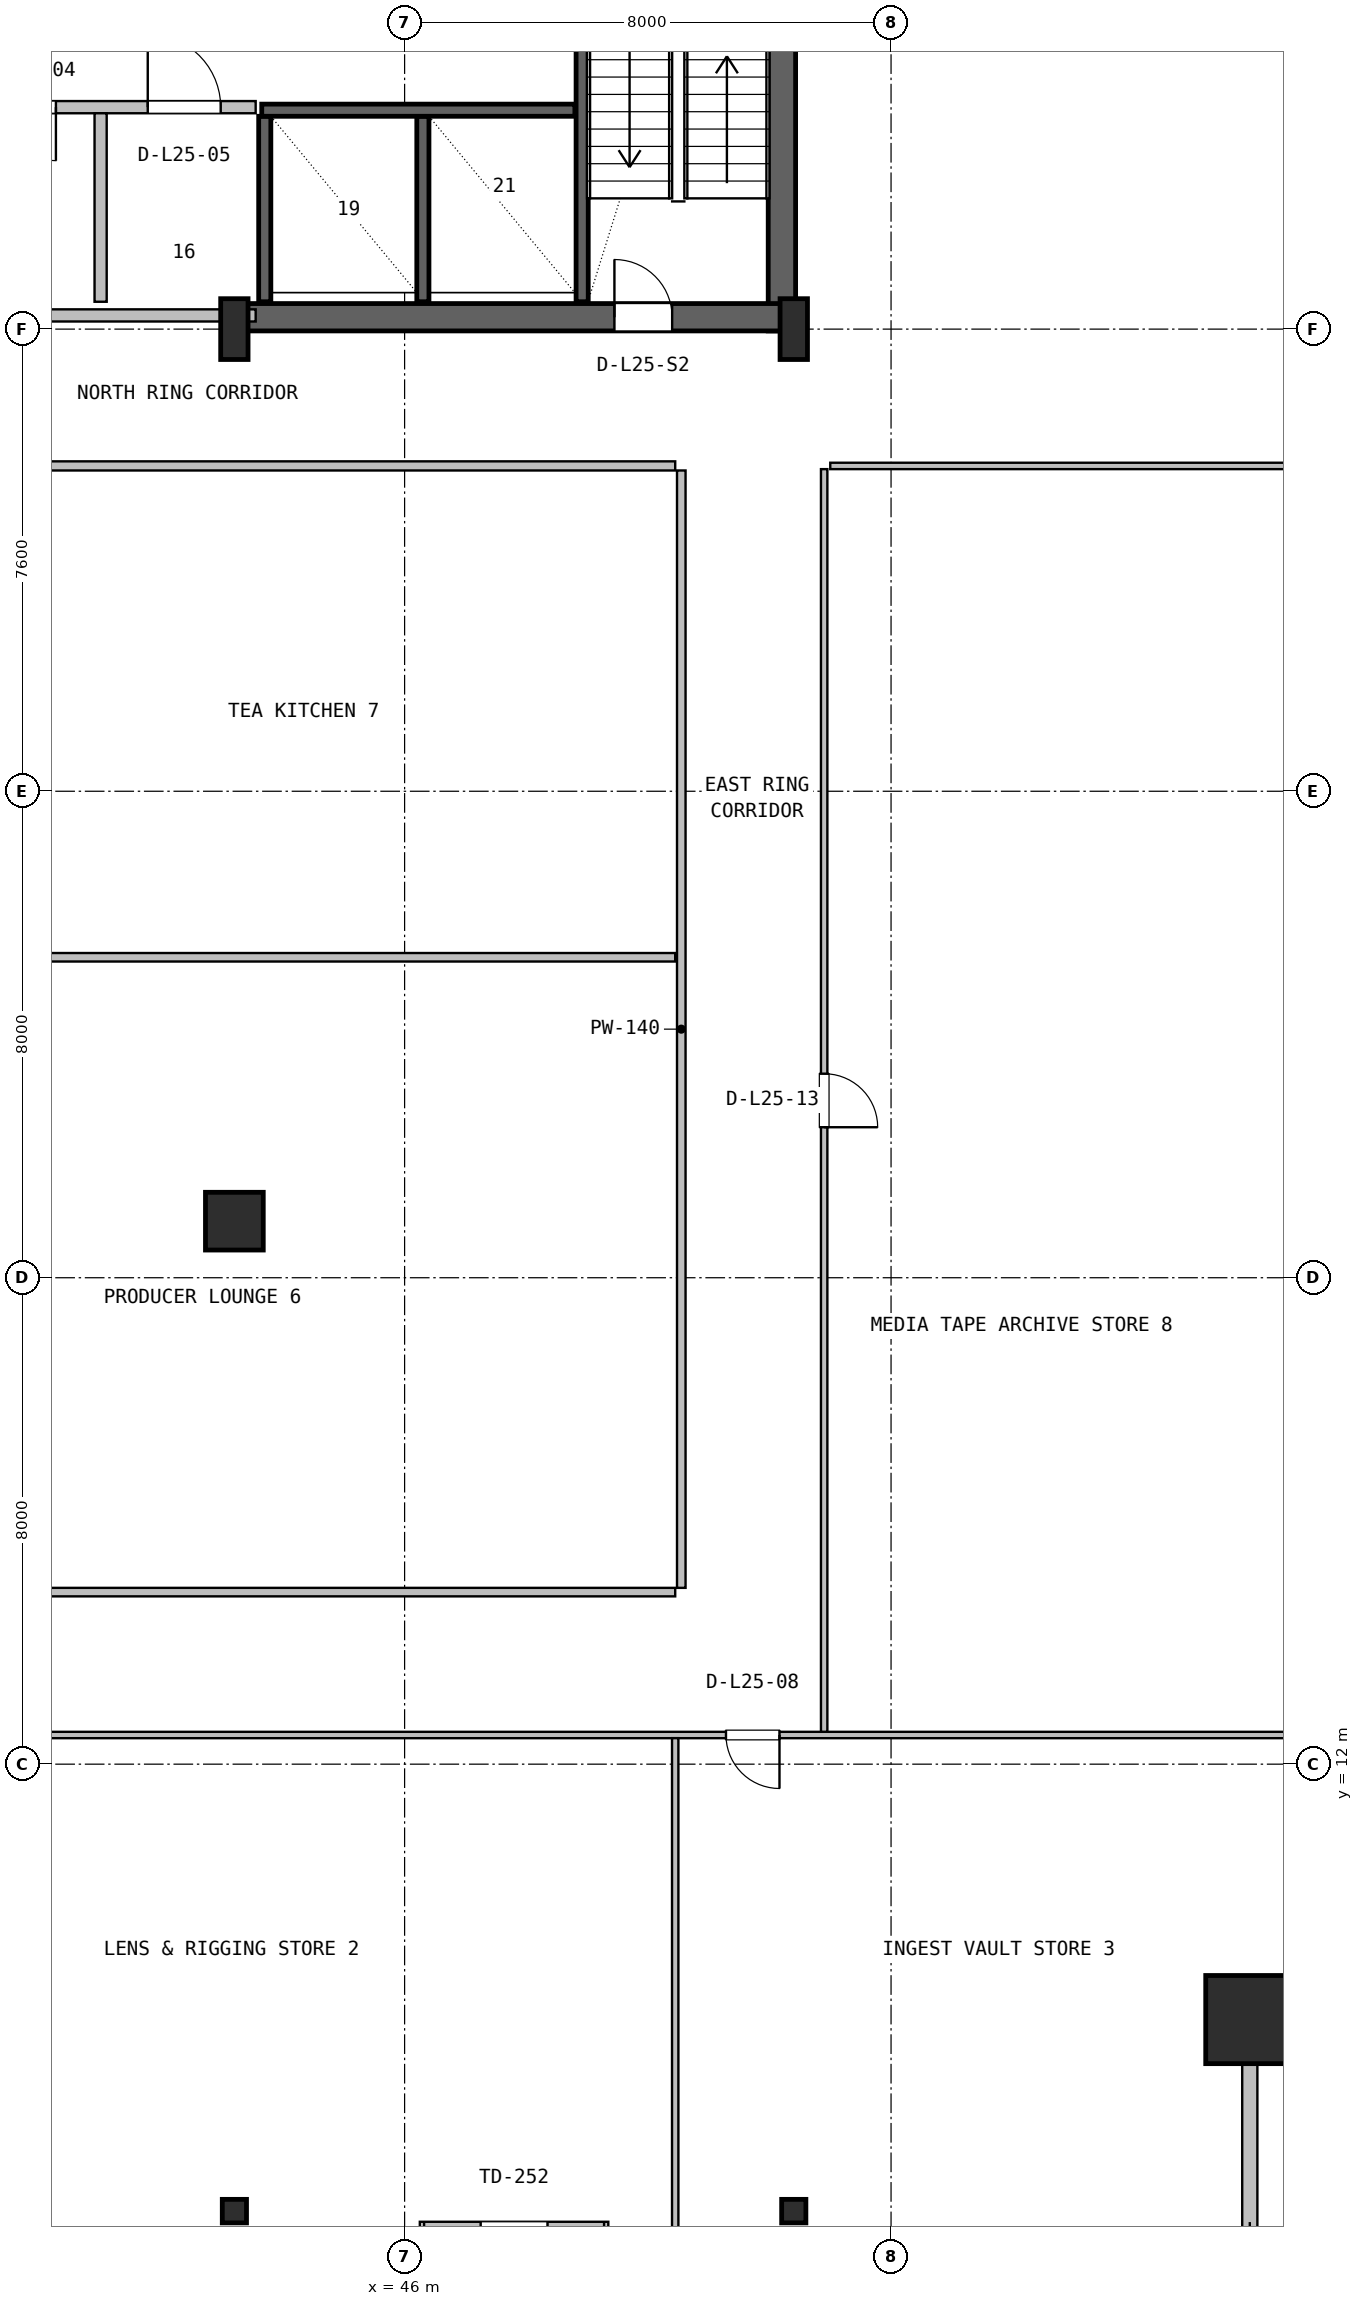
"""IFC4 building model, lengths in metres.
Left out: names, types, materials, properties, quantities, classifications, styles, units other than length and angle.
Written with IfcOpenShell. Run it as: python <this file> out.ifc"""

import sys

from ifc_helpers import new_model, si_unit, direction, frame, frame_2d, origin, origin_2d, place, context, subcontext, project, spatial, rectangle, hollow_rectangle, i_section, extrude, source, transform, mapped, element, fill, save


model = new_model("IFC4")
c1 = context("Model", 3, precision=1e-05, world=origin(), true_north=direction((0.0, 1.0)))
c2 = subcontext(c1, "Body", "Model", "MODEL_VIEW")
j1 = project(units=[si_unit("LENGTHUNIT", "METRE"), si_unit("PLANEANGLEUNIT", "RADIAN")], contexts=[c1])
p1 = place(None, origin())
s1 = spatial("IfcSite", under=j1, at=p1, CompositionType="ELEMENT")
p2 = place(p1, origin())
s2 = spatial("IfcBuilding", under=s1, at=p2, CompositionType="ELEMENT")
p3 = place(p2, frame((0.0, 0.0, 106.8)))
s3 = spatial("IfcBuildingStorey", under=s2, at=p3, CompositionType="ELEMENT", Elevation=106.8)
p4 = place(p3, frame((52.205, 35.57, 0.0), z_axis=(0.0, 0.0, 1.0), x_axis=(0.0, 1.0, 0.0)))
e1 = element("IfcWall", 1, at=p4, inside=s3, PredefinedType="SHEAR", context=c2, shape_type="SweptSolid", body=[
    extrude(rectangle(XDim=11.23, YDim=0.45, at=frame_2d((5.615, 0.0))), origin(), (0.0, 0.0, 1.0), 3.55),
])
p5 = place(p3, frame((43.2, 35.795, 0.0), z_axis=(0.0, 0.0, 1.0), x_axis=(1.0, 0.0, 0.0)))
e2 = element("IfcWall", 2, at=p5, inside=s3, PredefinedType="SHEAR", context=c2, shape_type="SweptSolid", body=[
    extrude(rectangle(XDim=9.23, YDim=0.45, at=frame_2d((4.615, 0.0))), origin(), (0.0, 0.0, 1.0), 3.55),
])
p6 = place(p5, frame((6.25, 0.0, 0.0)))
e3 = element("IfcOpeningElement", 3, at=p6, cuts=e2, PredefinedType="OPENING", context=c2, shape_type="SweptSolid", body=[
    extrude(rectangle(XDim=0.95, YDim=2.1, at=frame_2d((0.475, 1.05))), frame((0.0, 0.235, 0.0), z_axis=(0.0, -1.0, 0.0), x_axis=(1.0, 0.0, 0.0)), (0.0, 0.0, 1.0), 0.47),
])
m1 = source(origin(), c2, "Body", "SweptSolid", [
    extrude(i_section(OverallWidth=0.45, OverallDepth=1.0, WebThickness=0.016, FlangeThickness=0.03, FilletRadius=0.016, at=origin_2d()), origin(), (0.0, 0.0, 1.0), 3.8),
])
for number, where, z_axis, x_axis in (
    (4, (43.2, 35.6, 0.0), (0.0, 0.0, 1.0), (1.0, 0.0, 0.0)),
    (5, (52.4, 35.6, 0.0), (0.0, 0.0, 1.0), (1.0, 0.0, 0.0)),
):
    element("IfcColumn", number, at=place(p3, frame(where, z_axis=z_axis, x_axis=x_axis)), inside=s3, PredefinedType="COLUMN", context=c2, shape_type="MappedRepresentation", body=[
        mapped(m1, transform((0.0, 0.0, 0.0), x_axis=(1.0, 0.0, 0.0), y_axis=(0.0, 1.0, 0.0), z_axis=(0.0, 0.0, 1.0), scale=1.0)),
    ])
m2 = source(origin(), c2, "Body", "SweptSolid", [
    extrude(hollow_rectangle(XDim=1.45, YDim=1.45, WallThickness=0.055, at=origin_2d()), origin(), (0.0, 0.0, 1.0), 3.8),
])
p7 = place(p3, frame((59.9, 7.8, 0.0), z_axis=(0.0, 0.0, 1.0), x_axis=(1.0, 0.0, 0.0)))
e6 = element("IfcColumn", 6, at=p7, inside=s3, PredefinedType="COLUMN", context=c2, shape_type="MappedRepresentation", body=[
    mapped(m2, transform((0.0, 0.0, 0.0), x_axis=(1.0, 0.0, 0.0), y_axis=(0.0, 1.0, 0.0), z_axis=(0.0, 0.0, 1.0), scale=1.0)),
])
m3 = source(origin(), c2, "Body", "SweptSolid", [
    extrude(i_section(OverallWidth=0.398, OverallDepth=0.387, WebThickness=0.021, FlangeThickness=0.033, FilletRadius=0.018, at=origin_2d()), origin(), (0.0, 0.0, 1.0), 3.8),
])
for number, where, z_axis, x_axis in (
    (7, (43.2, 4.65, 0.0), (0.0, 0.0, 1.0), (1.0, 0.0, 0.0)),
    (8, (52.4, 4.65, 0.0), (0.0, 0.0, 1.0), (1.0, 0.0, 0.0)),
):
    element("IfcColumn", number, at=place(p3, frame(where, z_axis=z_axis, x_axis=x_axis)), inside=s3, PredefinedType="COLUMN", context=c2, shape_type="MappedRepresentation", body=[
        mapped(m3, transform((0.0, 0.0, 0.0), x_axis=(1.0, 0.0, 0.0), y_axis=(0.0, 1.0, 0.0), z_axis=(0.0, 0.0, 1.0), scale=1.0)),
    ])
m4 = source(origin(), c2, "Body", "SweptSolid", [
    extrude(rectangle(XDim=0.95, YDim=0.95, at=origin_2d()), origin(), (0.0, 0.0, 1.0), 3.8),
])
p8 = place(p3, frame((43.2, 20.93, 0.0), z_axis=(0.0, 0.0, 1.0), x_axis=(1.0, 0.0, 0.0)))
e9 = element("IfcColumn", 9, at=p8, inside=s3, PredefinedType="COLUMN", context=c2, shape_type="MappedRepresentation", body=[
    mapped(m4, transform((0.0, 0.0, 0.0), x_axis=(1.0, 0.0, 0.0), y_axis=(0.0, 1.0, 0.0), z_axis=(0.0, 0.0, 1.0), scale=1.0)),
])
p9 = place(p3, frame((46.25, 4.35, 0.0), z_axis=(0.0, 0.0, 1.0), x_axis=(1.0, 0.0, 0.0)))
e10 = element("IfcWall", 10, at=p9, inside=s3, PredefinedType="SOLIDWALL", context=c2, shape_type="SweptSolid", body=[
    extrude(rectangle(XDim=3.1, YDim=0.25, at=frame_2d((1.55, 0.0))), origin(), (0.0, 0.0, 1.0), 3.53),
])
p10 = place(p9, frame((1.0, 0.0, 0.0)))
e11 = element("IfcOpeningElement", 11, at=p10, cuts=e10, PredefinedType="OPENING", context=c2, shape_type="SweptSolid", body=[
    extrude(rectangle(XDim=1.1, YDim=2.15, at=frame_2d((0.55, 1.075))), frame((0.0, 0.135, 0.0), z_axis=(0.0, -1.0, 0.0), x_axis=(1.0, 0.0, 0.0)), (0.0, 0.0, 1.0), 0.27),
])
p11 = place(p3, frame((59.9, 4.28, 0.0), z_axis=(0.0, 0.0, 1.0), x_axis=(0.0, 1.0, 0.0)))
e12 = element("IfcWall", 12, at=p11, inside=s3, PredefinedType="SOLIDWALL", context=c2, shape_type="SweptSolid", body=[
    extrude(rectangle(XDim=3.6, YDim=0.25, at=frame_2d((1.8, 0.0))), origin(), (0.0, 0.0, 1.0), 3.108),
])
p12 = place(p3, frame((48.92, 36.05, 0.0), z_axis=(0.0, 0.0, 1.0), x_axis=(0.0, 1.0, 0.0)))
e13 = element("IfcWall", 13, at=p12, inside=s3, PredefinedType="SHEAR", context=c2, shape_type="SweptSolid", body=[
    extrude(rectangle(XDim=10.5, YDim=0.2, at=frame_2d((5.25, 0.0))), origin(), (0.0, 0.0, 1.0), 3.55),
])
for number, where, z_axis, x_axis in (
    (14, (43.7, 36.05, 0.0), (0.0, 0.0, 1.0), (0.0, 1.0, 0.0)),
    (15, (46.3, 36.05, 0.0), (0.0, 0.0, 1.0), (0.0, 1.0, 0.0)),
):
    element("IfcWall", number, at=place(p3, frame(where, z_axis=z_axis, x_axis=x_axis)), inside=s3, PredefinedType="SHEAR", context=c2, shape_type="SweptSolid", body=[
        extrude(rectangle(XDim=3.05, YDim=0.2, at=frame_2d((1.525, 0.0))), origin(), (0.0, 0.0, 1.0), 3.55),
    ])
p13 = place(p3, frame((43.65, 39.2, 0.0), z_axis=(0.0, 0.0, 1.0), x_axis=(1.0, 0.0, 0.0)))
e16 = element("IfcWall", 16, at=p13, inside=s3, PredefinedType="SHEAR", context=c2, shape_type="SweptSolid", body=[
    extrude(rectangle(XDim=5.15, YDim=0.2, at=frame_2d((2.575, 0.0))), origin(), (0.0, 0.0, 1.0), 3.55),
])
p14 = place(p3, frame((29.85, 35.825, 0.0), z_axis=(0.0, 0.0, 1.0), x_axis=(1.0, 0.0, 0.0)))
e17 = element("IfcWall", 17, at=p14, inside=s3, PredefinedType="SOLIDWALL", context=c2, shape_type="SweptSolid", body=[
    extrude(rectangle(XDim=13.7, YDim=0.2, at=frame_2d((6.85, 0.0))), origin(), (0.0, 0.0, 1.0), 2.325),
])
p15 = place(p3, frame((29.85, 39.25, 0.0), z_axis=(0.0, 0.0, 1.0), x_axis=(1.0, 0.0, 0.0)))
e18 = element("IfcWall", 18, at=p15, inside=s3, PredefinedType="SOLIDWALL", context=c2, shape_type="SweptSolid", body=[
    extrude(rectangle(XDim=13.7, YDim=0.2, at=frame_2d((6.85, 0.0))), origin(), (0.0, 0.0, 1.0), 3.53),
])
p16 = place(p15, frame((1.05, 0.0, 0.0)))
e19 = element("IfcOpeningElement", 19, at=p16, cuts=e18, PredefinedType="OPENING", context=c2, shape_type="SweptSolid", body=[
    extrude(rectangle(XDim=0.9, YDim=2.06, at=frame_2d((0.45, 1.03))), frame((0.0, 0.11, 0.0), z_axis=(0.0, -1.0, 0.0), x_axis=(1.0, 0.0, 0.0)), (0.0, 0.0, 1.0), 0.22),
])
p17 = place(p15, frame((4.05, 0.0, 0.0)))
e20 = element("IfcOpeningElement", 20, at=p17, cuts=e18, PredefinedType="OPENING", context=c2, shape_type="SweptSolid", body=[
    extrude(rectangle(XDim=0.9, YDim=2.06, at=frame_2d((0.45, 1.03))), frame((0.0, 0.11, 0.0), z_axis=(0.0, -1.0, 0.0), x_axis=(1.0, 0.0, 0.0)), (0.0, 0.0, 1.0), 0.22),
])
p18 = place(p15, frame((6.85, 0.0, 0.0)))
e21 = element("IfcOpeningElement", 21, at=p18, cuts=e18, PredefinedType="OPENING", context=c2, shape_type="SweptSolid", body=[
    extrude(rectangle(XDim=0.9, YDim=2.06, at=frame_2d((0.45, 1.03))), frame((0.0, 0.11, 0.0), z_axis=(0.0, -1.0, 0.0), x_axis=(1.0, 0.0, 0.0)), (0.0, 0.0, 1.0), 0.22),
])
p19 = place(p15, frame((9.535, 0.0, 0.0)))
e22 = element("IfcOpeningElement", 22, at=p19, cuts=e18, PredefinedType="OPENING", context=c2, shape_type="SweptSolid", body=[
    extrude(rectangle(XDim=0.88, YDim=2.06, at=frame_2d((0.44, 1.03))), frame((0.0, 0.11, 0.0), z_axis=(0.0, -1.0, 0.0), x_axis=(1.0, 0.0, 0.0)), (0.0, 0.0, 1.0), 0.22),
])
p20 = place(p15, frame((11.925, 0.0, 0.0)))
e23 = element("IfcOpeningElement", 23, at=p20, cuts=e18, PredefinedType="OPENING", context=c2, shape_type="SweptSolid", body=[
    extrude(rectangle(XDim=1.2, YDim=2.1, at=frame_2d((0.6, 1.05))), frame((0.0, 0.11, 0.0), z_axis=(0.0, -1.0, 0.0), x_axis=(1.0, 0.0, 0.0)), (0.0, 0.0, 1.0), 0.22),
])
p21 = place(p3, frame((41.0, 36.05, 0.0), z_axis=(0.0, 0.0, 1.0), x_axis=(0.0, 1.0, 0.0)))
e24 = element("IfcWall", 24, at=p21, inside=s3, PredefinedType="SOLIDWALL", context=c2, shape_type="SweptSolid", body=[
    extrude(rectangle(XDim=3.1, YDim=0.2, at=frame_2d((1.55, 0.0))), origin(), (0.0, 0.0, 1.0), 3.53),
])
p22 = place(p3, frame((4.68, 12.48, 0.0), z_axis=(0.0, 0.0, 1.0), x_axis=(1.0, 0.0, 0.0)))
e25 = element("IfcWall", 25, at=p22, inside=s3, PredefinedType="PARTITIONING", context=c2, shape_type="SweptSolid", body=[
    extrude(rectangle(XDim=58.64, YDim=0.105, at=frame_2d((29.32, 0.0))), origin(), (0.0, 0.0, 1.0), 2.83),
])
p23 = place(p22, frame((13.155, 0.0, 0.0)))
e26 = element("IfcOpeningElement", 26, at=p23, cuts=e25, PredefinedType="OPENING", context=c2, shape_type="SweptSolid", body=[
    extrude(rectangle(XDim=0.88, YDim=2.06, at=frame_2d((0.44, 1.03))), frame((0.0, 0.062, 0.0), z_axis=(0.0, -1.0, 0.0), x_axis=(1.0, 0.0, 0.0)), (0.0, 0.0, 1.0), 0.125),
])
p24 = place(p22, frame((29.88, 0.0, 0.0)))
e27 = element("IfcOpeningElement", 27, at=p24, cuts=e25, PredefinedType="OPENING", context=c2, shape_type="SweptSolid", body=[
    extrude(rectangle(XDim=0.88, YDim=2.06, at=frame_2d((0.44, 1.03))), frame((0.0, 0.062, 0.0), z_axis=(0.0, -1.0, 0.0), x_axis=(1.0, 0.0, 0.0)), (0.0, 0.0, 1.0), 0.125),
])
p25 = place(p22, frame((46.605, 0.0, 0.0)))
e28 = element("IfcOpeningElement", 28, at=p25, cuts=e25, PredefinedType="OPENING", context=c2, shape_type="SweptSolid", body=[
    extrude(rectangle(XDim=0.88, YDim=2.06, at=frame_2d((0.44, 1.03))), frame((0.0, 0.062, 0.0), z_axis=(0.0, -1.0, 0.0), x_axis=(1.0, 0.0, 0.0)), (0.0, 0.0, 1.0), 0.125),
])
p26 = place(p3, frame((50.45, 4.38, 0.0), z_axis=(0.0, 0.0, 1.0), x_axis=(0.0, 1.0, 0.0)))
e29 = element("IfcWall", 29, at=p26, inside=s3, PredefinedType="PARTITIONING", context=c2, shape_type="SweptSolid", body=[
    extrude(rectangle(XDim=8.048, YDim=0.105, at=frame_2d((4.024, 0.0))), origin(), (0.0, 0.0, 1.0), 3.108),
])
p27 = place(p3, frame((19.55, 14.83, 0.0), z_axis=(0.0, 0.0, 1.0), x_axis=(1.0, 0.0, 0.0)))
e30 = element("IfcWall", 30, at=p27, inside=s3, PredefinedType="PARTITIONING", context=c2, shape_type="SweptSolid", body=[
    extrude(rectangle(XDim=30.9, YDim=0.14, at=frame_2d((15.45, 0.0))), origin(), (0.0, 0.0, 1.0), 2.83),
])
p28 = place(p27, frame((14.95, 0.0, 0.0)))
e31 = element("IfcOpeningElement", 31, at=p28, cuts=e30, PredefinedType="OPENING", context=c2, shape_type="SweptSolid", body=[
    extrude(rectangle(XDim=1.0, YDim=2.1, at=frame_2d((0.5, 1.05))), frame((0.0, 0.08, 0.0), z_axis=(0.0, -1.0, 0.0), x_axis=(1.0, 0.0, 0.0)), (0.0, 0.0, 1.0), 0.16),
])
p29 = place(p3, frame((50.55, 14.9, 0.0), z_axis=(0.0, 0.0, 1.0), x_axis=(0.0, 1.0, 0.0)))
e32 = element("IfcWall", 32, at=p29, inside=s3, PredefinedType="PARTITIONING", context=c2, shape_type="SweptSolid", body=[
    extrude(rectangle(XDim=18.375, YDim=0.14, at=frame_2d((9.188, 0.0))), origin(), (0.0, 0.0, 1.0), 3.222),
])
p30 = place(p3, frame((19.55, 25.27, 0.0), z_axis=(0.0, 0.0, 1.0), x_axis=(1.0, 0.0, 0.0)))
e33 = element("IfcWall", 33, at=p30, inside=s3, PredefinedType="PARTITIONING", context=c2, shape_type="SweptSolid", body=[
    extrude(rectangle(XDim=30.9, YDim=0.14, at=frame_2d((15.45, 0.0))), origin(), (0.0, 0.0, 1.0), 2.83),
])
p31 = place(p3, frame((19.55, 33.35, 0.0), z_axis=(0.0, 0.0, 1.0), x_axis=(1.0, 0.0, 0.0)))
e34 = element("IfcWall", 34, at=p31, inside=s3, PredefinedType="PARTITIONING", context=c2, shape_type="SweptSolid", body=[
    extrude(rectangle(XDim=30.9, YDim=0.15, at=frame_2d((15.45, 0.0))), origin(), (0.0, 0.0, 1.0), 2.83),
])
p32 = place(p31, frame((15.01, 0.0, 0.0)))
e35 = element("IfcOpeningElement", 35, at=p32, cuts=e34, PredefinedType="OPENING", context=c2, shape_type="SweptSolid", body=[
    extrude(rectangle(XDim=0.88, YDim=2.06, at=frame_2d((0.44, 1.03))), frame((0.0, 0.085, 0.0), z_axis=(0.0, -1.0, 0.0), x_axis=(1.0, 0.0, 0.0)), (0.0, 0.0, 1.0), 0.17),
])
p33 = place(p3, frame((53.0, 33.35, 0.0), z_axis=(0.0, 0.0, 1.0), x_axis=(1.0, 0.0, 0.0)))
e36 = element("IfcWall", 36, at=p33, inside=s3, PredefinedType="PARTITIONING", context=c2, shape_type="SweptSolid", body=[
    extrude(rectangle(XDim=10.32, YDim=0.105, at=frame_2d((5.16, 0.0))), origin(), (0.0, 0.0, 1.0), 3.108),
])
p34 = place(p3, frame((52.9, 12.533, 0.0), z_axis=(0.0, 0.0, 1.0), x_axis=(0.0, 1.0, 0.0)))
e37 = element("IfcWall", 37, at=p34, inside=s3, PredefinedType="PARTITIONING", context=c2, shape_type="SweptSolid", body=[
    extrude(rectangle(XDim=20.764, YDim=0.105, at=frame_2d((10.382, 0.0))), origin(), (0.0, 0.0, 1.0), 3.222),
])
p35 = place(p34, frame((9.942, 0.0, 0.0)))
e38 = element("IfcOpeningElement", 38, at=p35, cuts=e37, PredefinedType="OPENING", context=c2, shape_type="SweptSolid", body=[
    extrude(rectangle(XDim=0.88, YDim=2.06, at=frame_2d((0.44, 1.03))), frame((0.0, 0.062, 0.0), z_axis=(0.0, -1.0, 0.0), x_axis=(1.0, 0.0, 0.0)), (0.0, 0.0, 1.0), 0.125),
])
m5 = source(origin(), c2, "Body", "SweptSolid", [
    extrude(rectangle(XDim=0.95, YDim=2.1, at=frame_2d((0.475, 1.05))), frame((0.0, 0.025, 0.0), z_axis=(0.0, -1.0, 0.0), x_axis=(1.0, 0.0, 0.0)), (0.0, 0.0, 1.0), 0.05),
])
p36 = place(p6, origin())
e39 = element("IfcDoor", 39, at=p36, inside=s3, OperationType="SINGLE_SWING_LEFT", PredefinedType="DOOR", context=c2, shape_type="MappedRepresentation", body=[
    mapped(m5, transform((0.0, 0.0, 0.0), x_axis=(1.0, 0.0, 0.0), y_axis=(0.0, 1.0, 0.0), z_axis=(0.0, 0.0, 1.0), scale=1.0)),
])
fill(e3, e39)
m6 = source(origin(), c2, "Body", "SweptSolid", [
    extrude(rectangle(XDim=0.88, YDim=2.06, at=frame_2d((0.44, 1.03))), frame((0.0, 0.025, 0.0), z_axis=(0.0, -1.0, 0.0), x_axis=(1.0, 0.0, 0.0)), (0.0, 0.0, 1.0), 0.05),
])
p37 = place(p19, frame((0.88, 0.0, 0.0), z_axis=(0.0, 0.0, 1.0), x_axis=(-1.0, 0.0, 0.0)))
e40 = element("IfcDoor", 40, at=p37, inside=s3, OperationType="SINGLE_SWING_RIGHT", PredefinedType="DOOR", context=c2, shape_type="MappedRepresentation", body=[
    mapped(m6, transform((0.0, 0.0, 0.0), x_axis=(1.0, 0.0, 0.0), y_axis=(0.0, 1.0, 0.0), z_axis=(0.0, 0.0, 1.0), scale=1.0)),
])
fill(e22, e40)
m7 = source(origin(), c2, "Body", "SweptSolid", [
    extrude(rectangle(XDim=1.2, YDim=2.1, at=frame_2d((0.6, 1.05))), frame((0.0, 0.025, 0.0), z_axis=(0.0, -1.0, 0.0), x_axis=(1.0, 0.0, 0.0)), (0.0, 0.0, 1.0), 0.05),
])
p38 = place(p20, origin())
e41 = element("IfcDoor", 41, at=p38, inside=s3, OperationType="SINGLE_SWING_LEFT", PredefinedType="DOOR", context=c2, shape_type="MappedRepresentation", body=[
    mapped(m7, transform((0.0, 0.0, 0.0), x_axis=(1.0, 0.0, 0.0), y_axis=(0.0, 1.0, 0.0), z_axis=(0.0, 0.0, 1.0), scale=1.0)),
])
fill(e23, e41)
p39 = place(p25, frame((0.88, 0.0, 0.0), z_axis=(0.0, 0.0, 1.0), x_axis=(-1.0, 0.0, 0.0)))
e42 = element("IfcDoor", 42, at=p39, inside=s3, OperationType="SINGLE_SWING_RIGHT", PredefinedType="DOOR", context=c2, shape_type="MappedRepresentation", body=[
    mapped(m6, transform((0.0, 0.0, 0.0), x_axis=(1.0, 0.0, 0.0), y_axis=(0.0, 1.0, 0.0), z_axis=(0.0, 0.0, 1.0), scale=1.0)),
])
fill(e28, e42)
p40 = place(p35, frame((0.88, 0.0, 0.0), z_axis=(0.0, 0.0, 1.0), x_axis=(-1.0, 0.0, 0.0)))
e43 = element("IfcDoor", 43, at=p40, inside=s3, OperationType="SINGLE_SWING_LEFT", PredefinedType="DOOR", context=c2, shape_type="MappedRepresentation", body=[
    mapped(m6, transform((0.0, 0.0, 0.0), x_axis=(1.0, 0.0, 0.0), y_axis=(0.0, 1.0, 0.0), z_axis=(0.0, 0.0, 1.0), scale=1.0)),
])
fill(e38, e43)
save(model, sys.argv[1])
